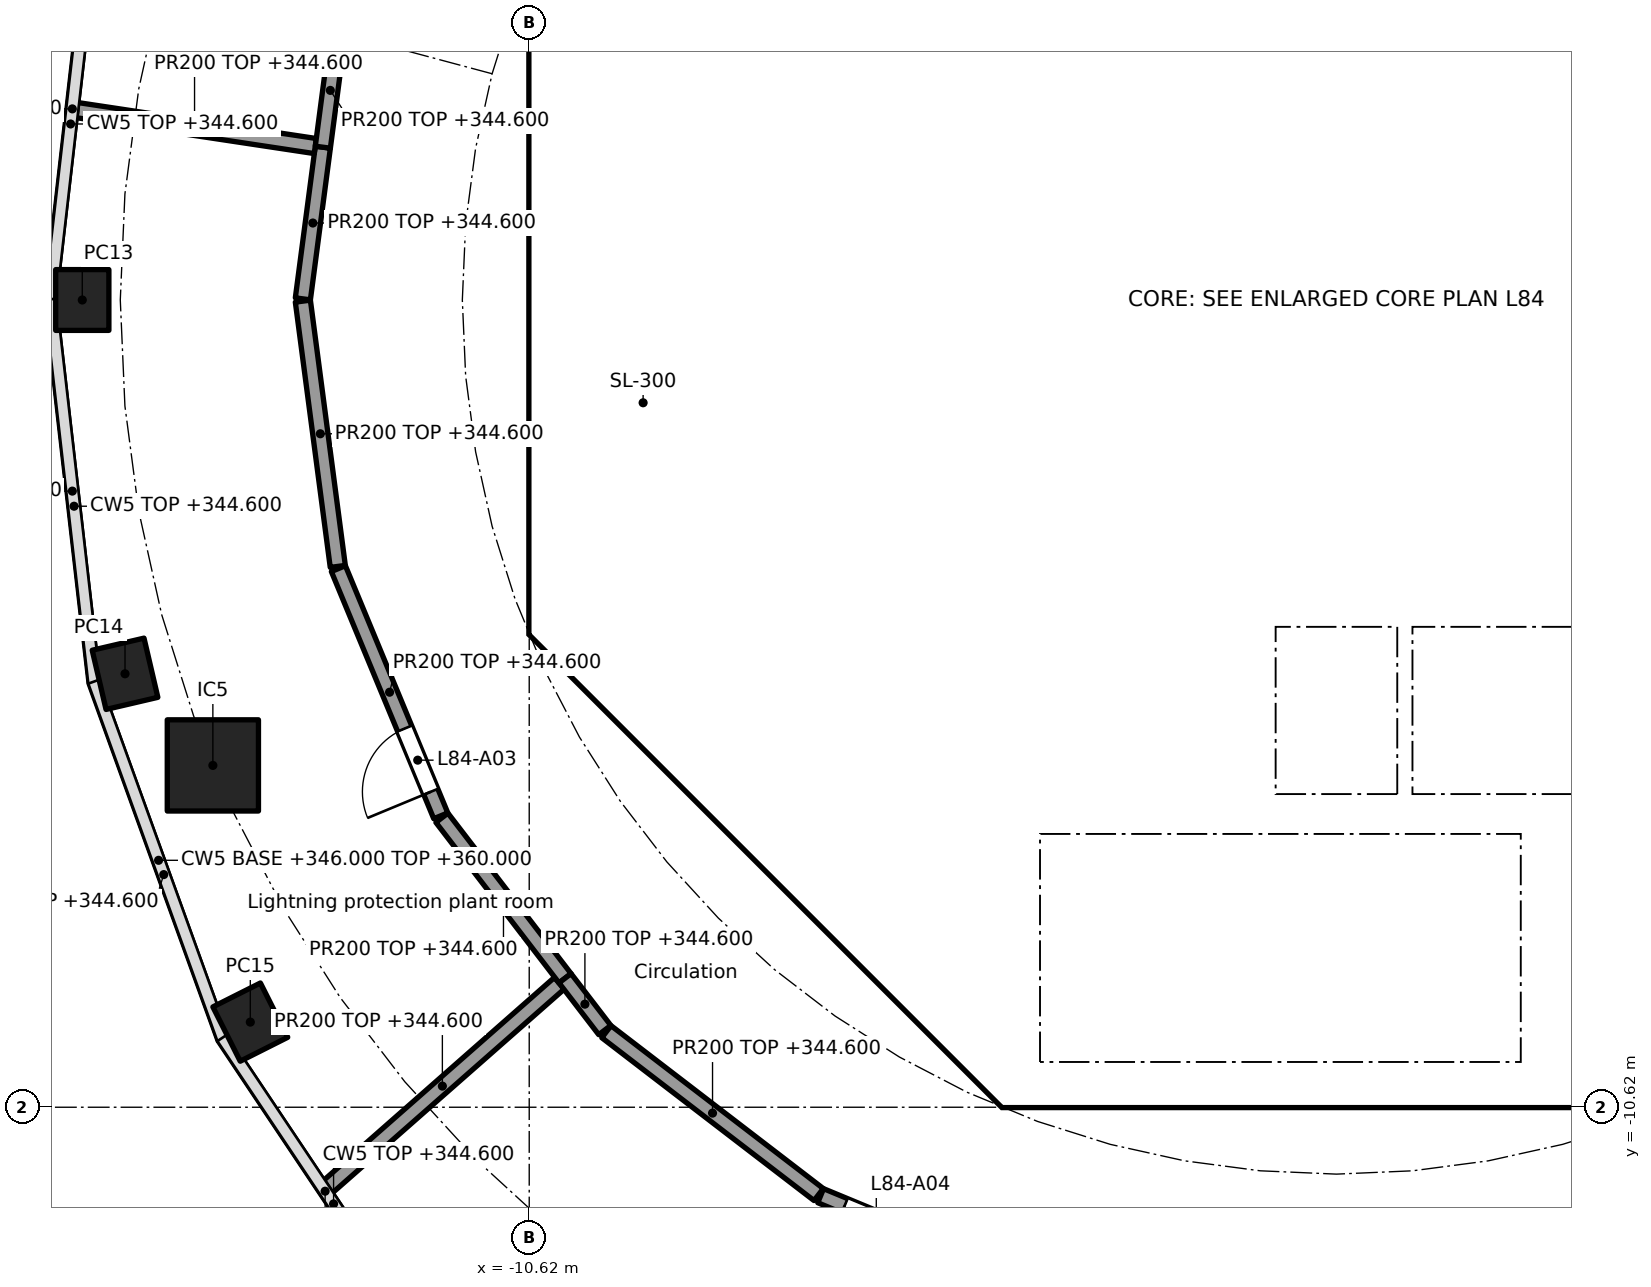
"""IFC4 building model, lengths in metres.
Left out: names, types, materials, properties, quantities, classifications, styles, units other than length and angle.
Written with IfcOpenShell. Run it as: python <this file> out.ifc"""

import sys

from ifc_helpers import new_model, si_unit, direction, frame, frame_2d, origin, origin_2d, place, context, subcontext, project, spatial, polyline, rectangle, hollow_rectangle, outline, extrude, element, fill, save


model = new_model("IFC4")
c1 = context("Model", 3, precision=1e-05, world=origin(), true_north=direction((0.0, 1.0)))
c2 = subcontext(c1, "Body", "Model", "MODEL_VIEW")
j1 = project(units=[si_unit("LENGTHUNIT", "METRE"), si_unit("PLANEANGLEUNIT", "RADIAN")], contexts=[c1])
p1 = place(None, origin())
s1 = spatial("IfcSite", under=j1, at=p1, CompositionType="ELEMENT")
p2 = place(p1, origin())
s2 = spatial("IfcBuilding", under=s1, at=p2, CompositionType="ELEMENT")
p3 = place(p2, frame((0.0, 0.0, 340.9)))
s3 = spatial("IfcBuildingStorey", under=s2, at=p3, CompositionType="ELEMENT", Elevation=340.9)
for number, where, z_axis, x_axis in (
    (1, (-16.5, 0.0, 0.0), (0.0, 0.0, 1.0), (0.0, -1.0, 0.0)),
    (2, (-15.938, -4.917, 0.0), (0.0, 0.0, 1.0), (0.227, -0.974, 0.0)),
    (3, (-14.289, -9.5, 0.0), (0.0, 0.0, 1.0), (0.45, -0.893, 0.0)),
):
    element("IfcColumn", number, at=place(p3, frame(where, z_axis=z_axis, x_axis=x_axis)), inside=s3, PredefinedType="COLUMN", context=c2, shape_type="SweptSolid", body=[
        extrude(hollow_rectangle(XDim=0.8, YDim=0.7, WallThickness=0.025, at=origin_2d()), origin(), (0.0, 0.0, 1.0), 4.0),
    ])
p4 = place(p3, frame((-14.782, -6.123, 0.0), z_axis=(0.0, 0.0, 1.0), x_axis=(1.0, 0.0, 0.0)))
e4 = element("IfcColumn", 4, at=p4, inside=s3, PredefinedType="COLUMN", context=c2, shape_type="SweptSolid", body=[
    extrude(rectangle(XDim=1.2, YDim=1.2, at=origin_2d()), origin(), (0.0, 0.0, 1.0), 4.0),
])
for number, where, z_axis, x_axis in (
    (5, (-16.297, 5.033, 4.0), (0.0, 0.0, 1.0), (-0.114, -0.993, 0.0)),
    (6, (-16.876, 0.014, 4.0), (0.0, 0.0, 1.0), (0.114, -0.993, 0.0)),
):
    element("IfcWall", number, at=place(p3, frame(where, z_axis=z_axis, x_axis=x_axis)), inside=s3, PredefinedType="PARAPET", context=c2, shape_type="SweptSolid", body=[
        extrude(rectangle(XDim=5.08, YDim=0.25, at=frame_2d((2.54, 0.0))), origin(), (0.0, 0.0, 1.0), 1.1),
    ])
p5 = place(p3, frame((-16.303, -5.004, 4.0), z_axis=(0.0, 0.0, 1.0), x_axis=(0.339625267064, -0.940560831617, 0.0)))
e7 = element("IfcWall", 7, at=p5, inside=s3, PredefinedType="PARAPET", context=c2, shape_type="SweptSolid", body=[
    extrude(rectangle(XDim=5.0, YDim=0.25, at=frame_2d((2.5, 0.0))), origin(), (0.0, 0.0, 1.0), 1.1),
])
p6 = place(p3, frame((-14.619, -9.68, 4.0), z_axis=(0.0, 0.0, 1.0), x_axis=(0.55602135043, -0.831168008207, 0.0)))
e8 = element("IfcWall", 8, at=p6, inside=s3, PredefinedType="PARAPET", context=c2, shape_type="SweptSolid", body=[
    extrude(rectangle(XDim=4.859, YDim=0.25, at=frame_2d((2.429, 0.0))), origin(), (0.0, 0.0, 1.0), 1.1),
])
p7 = place(p3, frame((-10.325, 3.801, 0.0), z_axis=(0.0, 0.0, 1.0), x_axis=(0.0, -1.0, 0.0)))
e9 = element("IfcWall", 9, at=p7, inside=s3, PredefinedType="SHEAR", context=c2, shape_type="SweptSolid", body=[
    extrude(rectangle(XDim=7.602, YDim=0.6, at=frame_2d((3.801, 0.0))), origin(), (0.0, 0.0, 1.0), 3.7),
])
p8 = place(p7, frame((0.651, 0.0, 0.0)))
e10 = element("IfcOpeningElement", 10, at=p8, cuts=e9, PredefinedType="OPENING", context=c2, shape_type="SweptSolid", body=[
    extrude(rectangle(XDim=1.5, YDim=2.1, at=frame_2d((0.75, 1.05))), frame((0.0, 0.31, 0.0), z_axis=(0.0, -1.0, 0.0), x_axis=(1.0, 0.0, 0.0)), (0.0, 0.0, 1.0), 0.62),
])
p9 = place(p7, frame((5.451, 0.0, 0.0)))
e11 = element("IfcOpeningElement", 11, at=p9, cuts=e9, PredefinedType="OPENING", context=c2, shape_type="SweptSolid", body=[
    extrude(rectangle(XDim=1.5, YDim=2.1, at=frame_2d((0.75, 1.05))), frame((0.0, 0.31, 0.0), z_axis=(0.0, -1.0, 0.0), x_axis=(1.0, 0.0, 0.0)), (0.0, 0.0, 1.0), 0.62),
])
p10 = place(p3, frame((-9.988, -4.613, 0.0), z_axis=(0.0, 0.0, 1.0), x_axis=(0.707106781187, -0.707106781187, 0.0)))
e12 = element("IfcWall", 12, at=p10, inside=s3, PredefinedType="SHEAR", context=c2, shape_type="SweptSolid", body=[
    extrude(rectangle(XDim=7.602, YDim=0.6, at=frame_2d((3.801, 0.0))), origin(), (0.0, 0.0, 1.0), 3.7),
])
p11 = place(p10, frame((6.151, 0.0, 0.0)))
e13 = element("IfcOpeningElement", 13, at=p11, cuts=e12, PredefinedType="OPENING", context=c2, shape_type="SweptSolid", body=[
    extrude(rectangle(XDim=1.1, YDim=2.1, at=frame_2d((0.55, 1.05))), frame((0.0, 0.31, 0.0), z_axis=(0.0, -1.0, 0.0), x_axis=(1.0, 0.0, 0.0)), (0.0, 0.0, 1.0), 0.62),
])
p12 = place(p3, frame((-6.7, 2.0, 0.0), z_axis=(0.0, 0.0, 1.0), x_axis=(1.0, 0.0, 0.0)))
e14 = element("IfcWall", 14, at=p12, inside=s3, PredefinedType="SOLIDWALL", context=c2, shape_type="SweptSolid", body=[
    extrude(rectangle(XDim=13.4, YDim=0.2, at=frame_2d((6.7, 0.0))), origin(), (0.0, 0.0, 1.0), 3.7),
])
p13 = place(p12, frame((2.95, 0.0, 0.0)))
e15 = element("IfcOpeningElement", 15, at=p13, cuts=e14, PredefinedType="OPENING", context=c2, shape_type="SweptSolid", body=[
    extrude(rectangle(XDim=0.9, YDim=2.1, at=frame_2d((0.45, 1.05))), frame((0.0, 0.11, 0.0), z_axis=(0.0, -1.0, 0.0), x_axis=(1.0, 0.0, 0.0)), (0.0, 0.0, 1.0), 0.22),
])
p14 = place(p12, frame((8.45, 0.0, 0.0)))
e16 = element("IfcOpeningElement", 16, at=p14, cuts=e14, PredefinedType="OPENING", context=c2, shape_type="SweptSolid", body=[
    extrude(rectangle(XDim=0.9, YDim=2.1, at=frame_2d((0.45, 1.05))), frame((0.0, 0.11, 0.0), z_axis=(0.0, -1.0, 0.0), x_axis=(1.0, 0.0, 0.0)), (0.0, 0.0, 1.0), 0.22),
])
p15 = place(p12, frame((11.75, 0.0, 0.0)))
e17 = element("IfcOpeningElement", 17, at=p15, cuts=e14, PredefinedType="OPENING", context=c2, shape_type="SweptSolid", body=[
    extrude(rectangle(XDim=0.9, YDim=2.1, at=frame_2d((0.45, 1.05))), frame((0.0, 0.11, 0.0), z_axis=(0.0, -1.0, 0.0), x_axis=(1.0, 0.0, 0.0)), (0.0, 0.0, 1.0), 0.22),
])
p16 = place(p3, frame((-7.0, -7.027, 0.0), z_axis=(0.0, 0.0, 1.0), x_axis=(0.0, 1.0, 0.0)))
e18 = element("IfcWall", 18, at=p16, inside=s3, PredefinedType="PARTITIONING", context=c2, shape_type="SweptSolid", body=[
    extrude(rectangle(XDim=2.927, YDim=0.15, at=frame_2d((1.463, 0.0))), origin(), (0.0, 0.0, 1.0), 3.7),
])
p17 = place(p16, frame((0.976, 0.0, 0.0)))
e19 = element("IfcOpeningElement", 19, at=p17, cuts=e18, PredefinedType="OPENING", context=c2, shape_type="SweptSolid", body=[
    extrude(rectangle(XDim=0.9, YDim=2.1, at=frame_2d((0.45, 1.05))), frame((0.0, 0.085, 0.0), z_axis=(0.0, -1.0, 0.0), x_axis=(1.0, 0.0, 0.0)), (0.0, 0.0, 1.0), 0.17),
])
p18 = place(p3, frame((-4.0, -6.5, 0.0), z_axis=(0.0, 0.0, 1.0), x_axis=(0.0, 1.0, 0.0)))
e20 = element("IfcWall", 20, at=p18, inside=s3, PredefinedType="SOLIDWALL", context=c2, shape_type="SweptSolid", body=[
    extrude(rectangle(XDim=2.2, YDim=0.2, at=frame_2d((1.1, 0.0))), origin(), (0.0, 0.0, 1.0), 3.7),
])
p19 = place(p18, frame((0.65, 0.0, 0.0)))
e21 = element("IfcOpeningElement", 21, at=p19, cuts=e20, PredefinedType="OPENING", context=c2, shape_type="SweptSolid", body=[
    extrude(rectangle(XDim=0.9, YDim=2.1, at=frame_2d((0.45, 1.05))), frame((0.0, 0.11, 0.0), z_axis=(0.0, -1.0, 0.0), x_axis=(1.0, 0.0, 0.0)), (0.0, 0.0, 1.0), 0.22),
])
p20 = place(p3, frame((-6.7, -2.0, 0.0), z_axis=(0.0, 0.0, 1.0), x_axis=(1.0, 0.0, 0.0)))
e22 = element("IfcWall", 22, at=p20, inside=s3, PredefinedType="SOLIDWALL", context=c2, shape_type="SweptSolid", body=[
    extrude(rectangle(XDim=13.4, YDim=0.2, at=frame_2d((6.7, 0.0))), origin(), (0.0, 0.0, 1.0), 3.7),
])
p21 = place(p20, frame((1.85, 0.0, 0.0)))
e23 = element("IfcOpeningElement", 23, at=p21, cuts=e22, PredefinedType="OPENING", context=c2, shape_type="SweptSolid", body=[
    extrude(rectangle(XDim=0.9, YDim=2.1, at=frame_2d((0.45, 1.05))), frame((0.0, 0.11, 0.0), z_axis=(0.0, -1.0, 0.0), x_axis=(1.0, 0.0, 0.0)), (0.0, 0.0, 1.0), 0.22),
])
p22 = place(p20, frame((6.25, 0.0, 0.0)))
e24 = element("IfcOpeningElement", 24, at=p22, cuts=e22, PredefinedType="OPENING", context=c2, shape_type="SweptSolid", body=[
    extrude(rectangle(XDim=0.9, YDim=2.1, at=frame_2d((0.45, 1.05))), frame((0.0, 0.11, 0.0), z_axis=(0.0, -1.0, 0.0), x_axis=(1.0, 0.0, 0.0)), (0.0, 0.0, 1.0), 0.22),
])
p23 = place(p20, frame((10.65, 0.0, 0.0)))
e25 = element("IfcOpeningElement", 25, at=p23, cuts=e22, PredefinedType="OPENING", context=c2, shape_type="SweptSolid", body=[
    extrude(rectangle(XDim=0.9, YDim=2.1, at=frame_2d((0.45, 1.05))), frame((0.0, 0.11, 0.0), z_axis=(0.0, -1.0, 0.0), x_axis=(1.0, 0.0, 0.0)), (0.0, 0.0, 1.0), 0.22),
])
p24 = place(p3, origin())
e26 = element("IfcWall", 26, at=p24, inside=s3, PredefinedType="SHEAR", context=c2, shape_type="SweptSolid", body=[
    extrude(outline(polyline([(-10.625, -3.801), (-10.025, -3.801), (-10.025, -4.152), (-9.776, -4.401), (-10.2, -4.825), (-10.625, -4.401), (-10.625, -3.801)])), origin(), (0.0, 0.0, 1.0), 3.7),
])
p25 = place(p3, origin())
e27 = element("IfcWall", 27, at=p25, inside=s3, PredefinedType="SHEAR", context=c2, shape_type="SweptSolid", body=[
    extrude(outline(polyline([(-4.152, -10.025), (4.152, -10.025), (4.401, -9.776), (4.825, -10.2), (4.401, -10.625), (-4.401, -10.625), (-4.825, -10.2), (-4.401, -9.776), (-4.152, -10.025)])), origin(), (0.0, 0.0, 1.0), 3.7),
])
for number, where, z_axis, x_axis in (
    (28, (-0.9, -6.5, 0.0), (0.0, 0.0, 1.0), (0.0, 1.0, 0.0)),
    (29, (0.9, -6.5, 0.0), (0.0, 0.0, 1.0), (0.0, 1.0, 0.0)),
):
    element("IfcWall", number, at=place(p3, frame(where, z_axis=z_axis, x_axis=x_axis)), inside=s3, PredefinedType="SOLIDWALL", context=c2, shape_type="SweptSolid", body=[
        extrude(rectangle(XDim=2.2, YDim=0.2, at=frame_2d((1.1, 0.0))), origin(), (0.0, 0.0, 1.0), 3.7),
    ])
p26 = place(p3, origin())
e30 = element("IfcWall", 30, at=p26, inside=s3, PredefinedType="SOLIDWALL", context=c2, shape_type="SweptSolid", body=[
    extrude(outline(polyline([(-6.7, -2.1), (-6.5, -2.1), (-6.5, -4.1), (-2.3, -4.1), (-2.3, -2.1), (-2.1, -2.1), (-2.1, -4.1), (2.1, -4.1), (2.1, -2.1), (2.3, -2.1), (2.3, -4.1), (6.5, -4.1), (6.5, -2.1), (6.7, -2.1), (6.7, -4.3), (-6.7, -4.3), (-6.7, -2.1)])), origin(), (0.0, 0.0, 1.0), 3.7),
])
p27 = place(p3, origin())
e31 = element("IfcWall", 31, at=p27, inside=s3, PredefinedType="SOLIDWALL", context=c2, shape_type="SweptSolid", body=[
    extrude(outline(polyline([(-6.7, 4.3), (6.7, 4.3), (6.7, 2.1), (6.5, 2.1), (6.5, 4.1), (4.5, 4.1), (4.5, 2.1), (4.3, 2.1), (4.3, 4.1), (0.1, 4.1), (0.1, 2.1), (-0.1, 2.1), (-0.1, 4.1), (-6.5, 4.1), (-6.5, 2.1), (-6.7, 2.1), (-6.7, 4.3)])), origin(), (0.0, 0.0, 1.0), 3.7),
])
p28 = place(p3, frame((-10.025, -4.0, 0.0), z_axis=(0.0, 0.0, 1.0), x_axis=(1.0, 0.0, 0.0)))
e32 = element("IfcWall", 32, at=p28, inside=s3, PredefinedType="PARTITIONING", context=c2, shape_type="SweptSolid", body=[
    extrude(rectangle(XDim=3.325, YDim=0.2, at=frame_2d((1.662, 0.0))), origin(), (0.0, 0.0, 1.0), 3.7),
])
p29 = place(p3, origin())
e33 = element("IfcWall", 33, at=p29, inside=s3, PredefinedType="SOLIDWALL", context=c2, shape_type="SweptSolid", body=[
    extrude(outline(polyline([(-3.9, -10.025), (-4.1, -10.025), (-4.1, -7.025), (-3.9, -7.025), (-3.9, -10.025)])), origin(), (0.0, 0.0, 1.0), 3.7),
])
p30 = place(p3, origin())
e34 = element("IfcWall", 34, at=p30, inside=s3, PredefinedType="SOLIDWALL", context=c2, shape_type="SweptSolid", body=[
    extrude(outline(polyline([(4.1, -7.025), (-4.1, -7.025), (-4.1, -6.5), (4.1, -6.5), (4.1, -7.025)])), origin(), (0.0, 0.0, 1.0), 3.7),
])
p31 = place(p3, frame((-13.598, 0.015, 0.0), z_axis=(0.0, 0.0, 1.0), x_axis=(0.130526685544, 0.991444796426, 0.0)))
e35 = element("IfcWall", 35, at=p31, inside=s3, PredefinedType="PARTITIONING", context=c2, shape_type="SweptSolid", body=[
    extrude(rectangle(XDim=2.013, YDim=0.2, at=frame_2d((1.006, 0.0))), origin(), (0.0, 0.0, 1.0), 3.7),
])
p32 = place(p3, frame((-13.434, 2.025, 0.0), z_axis=(0.0, 0.0, 1.0), x_axis=(-0.988817905908, 0.149127961685, 0.0)))
e36 = element("IfcWall", 36, at=p32, inside=s3, PredefinedType="PARTITIONING", context=c2, shape_type="SweptSolid", body=[
    extrude(rectangle(XDim=3.214, YDim=0.2, at=frame_2d((1.607, 0.0))), origin(), (0.0, 0.0, 1.0), 3.7),
])
p33 = place(p3, frame((-13.335, 2.01, 0.0), z_axis=(0.0, 0.0, 1.0), x_axis=(0.130391662061, 0.99146256332, 0.0)))
e37 = element("IfcWall", 37, at=p33, inside=s3, PredefinedType="PARTITIONING", context=c2, shape_type="SweptSolid", body=[
    extrude(rectangle(XDim=1.507, YDim=0.2, at=frame_2d((0.754, 0.0))), origin(), (0.0, 0.0, 1.0), 3.7),
])
p34 = place(p3, frame((-13.139, -3.505, 0.0), z_axis=(0.0, 0.0, 1.0), x_axis=(-0.130468866457, 0.991452406768, 0.0)))
e38 = element("IfcWall", 38, at=p34, inside=s3, PredefinedType="PARTITIONING", context=c2, shape_type="SweptSolid", body=[
    extrude(rectangle(XDim=3.52, YDim=0.2, at=frame_2d((1.76, 0.0))), origin(), (0.0, 0.0, 1.0), 3.7),
])
p35 = place(p3, frame((-11.784, -6.786, 0.0), z_axis=(0.0, 0.0, 1.0), x_axis=(-0.382723413813, 0.92386297064, 0.0)))
e39 = element("IfcWall", 39, at=p35, inside=s3, PredefinedType="PARTITIONING", context=c2, shape_type="SweptSolid", body=[
    extrude(rectangle(XDim=3.52, YDim=0.2, at=frame_2d((1.76, 0.0))), origin(), (0.0, 0.0, 1.0), 3.7),
])
p36 = place(p35, frame((0.342, 0.0, 0.0)))
e40 = element("IfcOpeningElement", 40, at=p36, cuts=e39, PredefinedType="OPENING", context=c2, shape_type="SweptSolid", body=[
    extrude(rectangle(XDim=0.9, YDim=2.1, at=frame_2d((0.45, 1.05))), frame((0.0, 0.11, 0.0), z_axis=(0.0, -1.0, 0.0), x_axis=(1.0, 0.0, 0.0)), (0.0, 0.0, 1.0), 0.22),
])
p37 = place(p3, frame((-10.224, -8.989, 0.0), z_axis=(0.0, 0.0, 1.0), x_axis=(-0.750994766266, -0.660308156122, 0.0)))
e41 = element("IfcWall", 41, at=p37, inside=s3, PredefinedType="PARTITIONING", context=c2, shape_type="SweptSolid", body=[
    extrude(rectangle(XDim=4.097, YDim=0.2, at=frame_2d((2.049, 0.0))), origin(), (0.0, 0.0, 1.0), 3.7),
])
p38 = place(p3, frame((-10.149, -8.923, 0.0), z_axis=(0.0, 0.0, 1.0), x_axis=(-0.608699260048, 0.793401040343, 0.0)))
e42 = element("IfcWall", 42, at=p38, inside=s3, PredefinedType="PARTITIONING", context=c2, shape_type="SweptSolid", body=[
    extrude(rectangle(XDim=2.661, YDim=0.2, at=frame_2d((1.331, 0.0))), origin(), (0.0, 0.0, 1.0), 3.7),
])
p39 = place(p3, frame((-9.626, -9.605, 0.0), z_axis=(0.0, 0.0, 1.0), x_axis=(-0.608694005511, 0.793405071609, 0.0)))
e43 = element("IfcWall", 43, at=p39, inside=s3, PredefinedType="PARTITIONING", context=c2, shape_type="SweptSolid", body=[
    extrude(rectangle(XDim=0.859, YDim=0.2, at=frame_2d((0.43, 0.0))), origin(), (0.0, 0.0, 1.0), 3.7),
])
p40 = place(p3, frame((-6.812, -11.769, 0.0), z_axis=(0.0, 0.0, 1.0), x_axis=(-0.793402024283, 0.608697977542, 0.0)))
e44 = element("IfcWall", 44, at=p40, inside=s3, PredefinedType="PARTITIONING", context=c2, shape_type="SweptSolid", body=[
    extrude(rectangle(XDim=3.52, YDim=0.2, at=frame_2d((1.76, 0.0))), origin(), (0.0, 0.0, 1.0), 3.7),
])
p41 = place(p3, frame((-3.534, -13.131, 0.0), z_axis=(0.0, 0.0, 1.0), x_axis=(-0.92386297064, 0.382723413813, 0.0)))
e45 = element("IfcWall", 45, at=p41, inside=s3, PredefinedType="PARTITIONING", context=c2, shape_type="SweptSolid", body=[
    extrude(rectangle(XDim=3.52, YDim=0.2, at=frame_2d((1.76, 0.0))), origin(), (0.0, 0.0, 1.0), 3.7),
])
p42 = place(p41, frame((2.278, 0.0, 0.0)))
e46 = element("IfcOpeningElement", 46, at=p42, cuts=e45, PredefinedType="OPENING", context=c2, shape_type="SweptSolid", body=[
    extrude(rectangle(XDim=0.9, YDim=2.1, at=frame_2d((0.45, 1.05))), frame((0.0, 0.11, 0.0), z_axis=(0.0, -1.0, 0.0), x_axis=(1.0, 0.0, 0.0)), (0.0, 0.0, 1.0), 0.22),
])
p43 = place(p17, origin())
e47 = element("IfcDoor", 47, at=p43, inside=s3, OperationType="SINGLE_SWING_LEFT", PredefinedType="DOOR", context=c2, shape_type="SweptSolid", body=[
    extrude(rectangle(XDim=0.9, YDim=2.1, at=frame_2d((0.45, 1.05))), frame((0.0, 0.025, 0.0), z_axis=(0.0, -1.0, 0.0), x_axis=(1.0, 0.0, 0.0)), (0.0, 0.0, 1.0), 0.05),
])
fill(e19, e47)
p44 = place(p19, frame((0.9, 0.0, 0.0), x_axis=(-1.0, 0.0, 0.0)))
e48 = element("IfcDoor", 48, at=p44, inside=s3, OperationType="SINGLE_SWING_RIGHT", PredefinedType="DOOR", context=c2, shape_type="SweptSolid", body=[
    extrude(rectangle(XDim=0.9, YDim=2.1, at=frame_2d((0.45, 1.05))), frame((0.0, 0.025, 0.0), z_axis=(0.0, -1.0, 0.0), x_axis=(1.0, 0.0, 0.0)), (0.0, 0.0, 1.0), 0.05),
])
fill(e21, e48)
p45 = place(p13, origin())
e49 = element("IfcDoor", 49, at=p45, inside=s3, OperationType="SINGLE_SWING_RIGHT", PredefinedType="DOOR", context=c2, shape_type="SweptSolid", body=[
    extrude(rectangle(XDim=0.9, YDim=2.1, at=frame_2d((0.45, 1.05))), frame((0.0, 0.025, 0.0), z_axis=(0.0, -1.0, 0.0), x_axis=(1.0, 0.0, 0.0)), (0.0, 0.0, 1.0), 0.05),
])
fill(e15, e49)
p46 = place(p14, origin())
e50 = element("IfcDoor", 50, at=p46, inside=s3, OperationType="SINGLE_SWING_RIGHT", PredefinedType="DOOR", context=c2, shape_type="SweptSolid", body=[
    extrude(rectangle(XDim=0.9, YDim=2.1, at=frame_2d((0.45, 1.05))), frame((0.0, 0.025, 0.0), z_axis=(0.0, -1.0, 0.0), x_axis=(1.0, 0.0, 0.0)), (0.0, 0.0, 1.0), 0.05),
])
fill(e16, e50)
p47 = place(p21, frame((0.9, 0.0, 0.0), x_axis=(-1.0, 0.0, 0.0)))
e51 = element("IfcDoor", 51, at=p47, inside=s3, OperationType="SINGLE_SWING_LEFT", PredefinedType="DOOR", context=c2, shape_type="SweptSolid", body=[
    extrude(rectangle(XDim=0.9, YDim=2.1, at=frame_2d((0.45, 1.05))), frame((0.0, 0.025, 0.0), z_axis=(0.0, -1.0, 0.0), x_axis=(1.0, 0.0, 0.0)), (0.0, 0.0, 1.0), 0.05),
])
fill(e23, e51)
p48 = place(p22, frame((0.9, 0.0, 0.0), x_axis=(-1.0, 0.0, 0.0)))
e52 = element("IfcDoor", 52, at=p48, inside=s3, OperationType="SINGLE_SWING_LEFT", PredefinedType="DOOR", context=c2, shape_type="SweptSolid", body=[
    extrude(rectangle(XDim=0.9, YDim=2.1, at=frame_2d((0.45, 1.05))), frame((0.0, 0.025, 0.0), z_axis=(0.0, -1.0, 0.0), x_axis=(1.0, 0.0, 0.0)), (0.0, 0.0, 1.0), 0.05),
])
fill(e24, e52)
p49 = place(p8, origin())
e53 = element("IfcDoor", 53, at=p49, inside=s3, OperationType="DOUBLE_DOOR_SINGLE_SWING", PredefinedType="DOOR", context=c2, shape_type="SweptSolid", body=[
    extrude(rectangle(XDim=1.5, YDim=2.1, at=frame_2d((0.75, 1.05))), frame((0.0, 0.025, 0.0), z_axis=(0.0, -1.0, 0.0), x_axis=(1.0, 0.0, 0.0)), (0.0, 0.0, 1.0), 0.05),
])
fill(e10, e53)
p50 = place(p9, origin())
e54 = element("IfcDoor", 54, at=p50, inside=s3, OperationType="DOUBLE_DOOR_SINGLE_SWING", PredefinedType="DOOR", context=c2, shape_type="SweptSolid", body=[
    extrude(rectangle(XDim=1.5, YDim=2.1, at=frame_2d((0.75, 1.05))), frame((0.0, 0.025, 0.0), z_axis=(0.0, -1.0, 0.0), x_axis=(1.0, 0.0, 0.0)), (0.0, 0.0, 1.0), 0.05),
])
fill(e11, e54)
p51 = place(p11, origin())
e55 = element("IfcDoor", 55, at=p51, inside=s3, OperationType="SINGLE_SWING_LEFT", PredefinedType="DOOR", context=c2, shape_type="SweptSolid", body=[
    extrude(rectangle(XDim=1.1, YDim=2.1, at=frame_2d((0.55, 1.05))), frame((0.0, 0.025, 0.0), z_axis=(0.0, -1.0, 0.0), x_axis=(1.0, 0.0, 0.0)), (0.0, 0.0, 1.0), 0.05),
])
fill(e13, e55)
p52 = place(p36, origin())
e56 = element("IfcDoor", 56, at=p52, inside=s3, OperationType="SINGLE_SWING_LEFT", PredefinedType="DOOR", context=c2, shape_type="SweptSolid", body=[
    extrude(rectangle(XDim=0.9, YDim=2.1, at=frame_2d((0.45, 1.05))), frame((0.0, 0.025, 0.0), z_axis=(0.0, -1.0, 0.0), x_axis=(1.0, 0.0, 0.0)), (0.0, 0.0, 1.0), 0.05),
])
fill(e40, e56)
p53 = place(p42, origin())
e57 = element("IfcDoor", 57, at=p53, inside=s3, OperationType="SINGLE_SWING_RIGHT", PredefinedType="DOOR", context=c2, shape_type="SweptSolid", body=[
    extrude(rectangle(XDim=0.9, YDim=2.1, at=frame_2d((0.45, 1.05))), frame((0.0, 0.025, 0.0), z_axis=(0.0, -1.0, 0.0), x_axis=(1.0, 0.0, 0.0)), (0.0, 0.0, 1.0), 0.05),
])
fill(e46, e57)
save(model, sys.argv[1])
